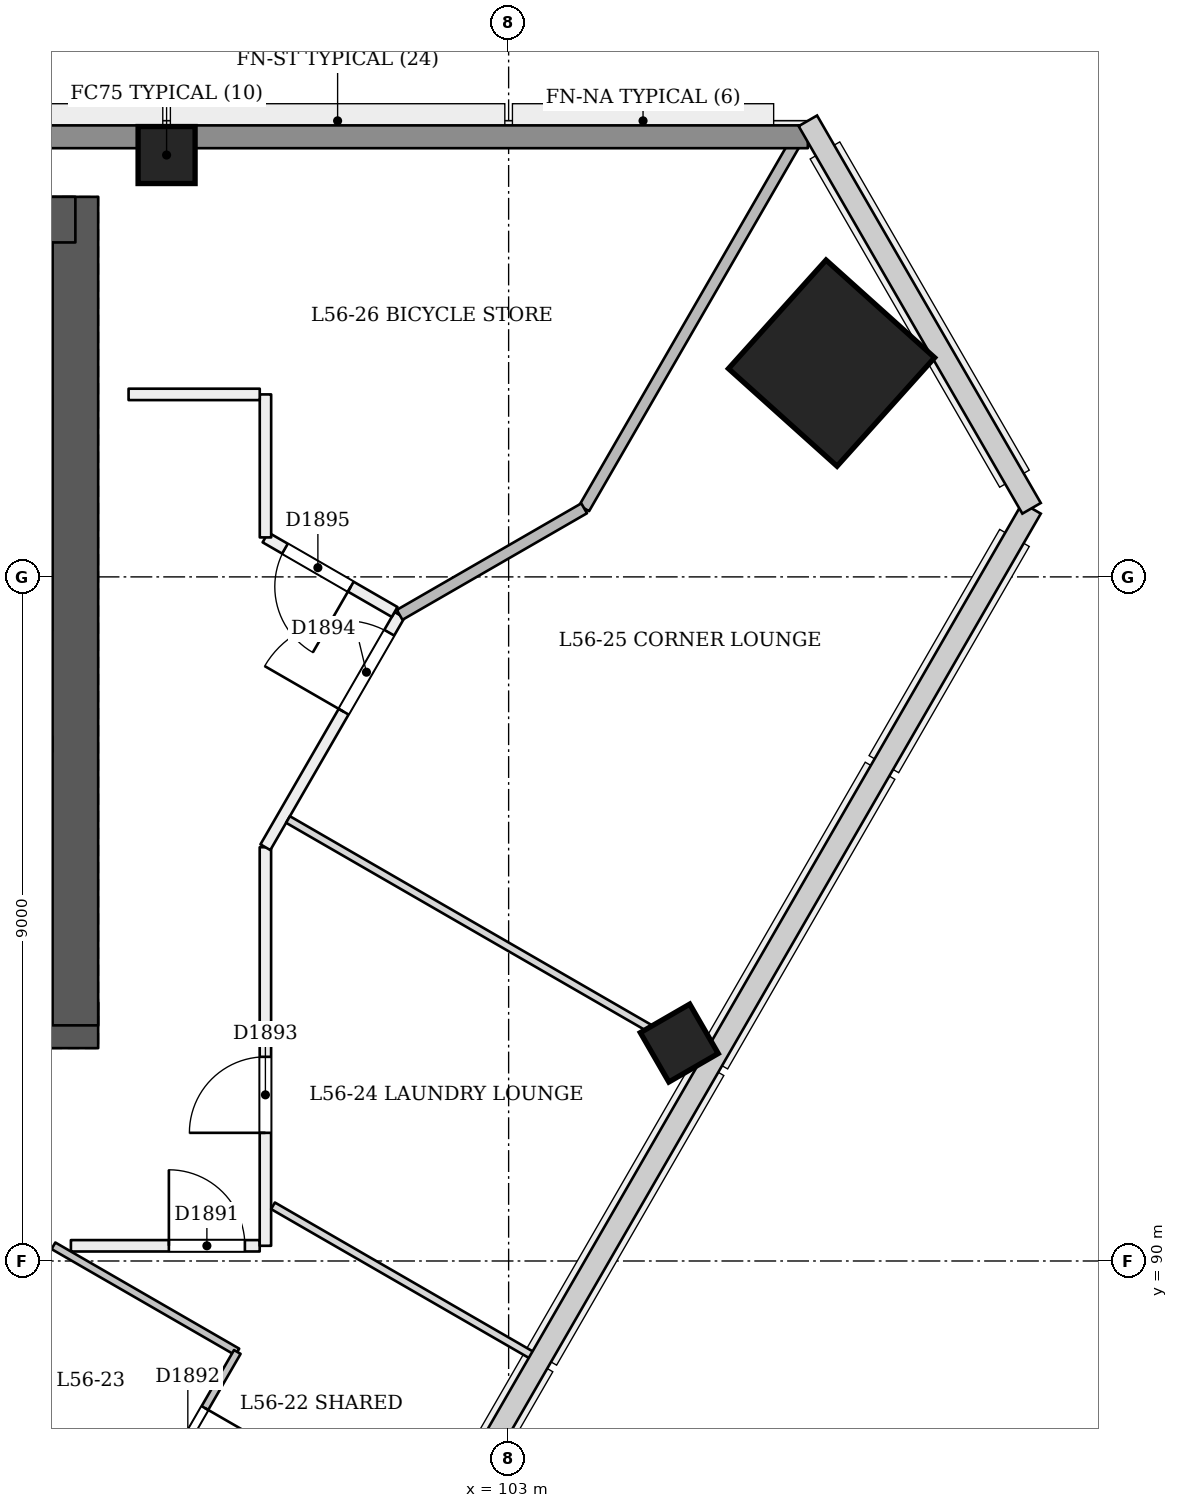
"""IFC4 building model, lengths in metres.
Left out: names, types, materials, properties, quantities, classifications, styles, units other than length and angle.
Written with IfcOpenShell. Run it as: python <this file> out.ifc"""

import sys

from ifc_helpers import new_model, si_unit, direction, frame, frame_2d, origin, origin_2d, place, context, subcontext, project, spatial, rectangle, extrude, element, fill, save


model = new_model("IFC4")
c1 = context("Model", 3, precision=1e-05, world=origin(), true_north=direction((0.0, 1.0)))
c2 = subcontext(c1, "Body", "Model", "MODEL_VIEW")
j1 = project(units=[si_unit("LENGTHUNIT", "METRE"), si_unit("PLANEANGLEUNIT", "RADIAN")], contexts=[c1])
p1 = place(None, origin())
s1 = spatial("IfcSite", under=j1, at=p1, CompositionType="ELEMENT")
p2 = place(p1, origin())
s2 = spatial("IfcBuilding", under=s1, at=p2, CompositionType="ELEMENT")
p3 = place(p2, frame((0.0, 0.0, 219.4)))
s3 = spatial("IfcBuildingStorey", under=s2, at=p3, CompositionType="ELEMENT", Elevation=219.4)
p4 = place(p3, frame((72.7, 93.1, 0.0), z_axis=(0.0, 0.0, 1.0), x_axis=(1.0, 0.0, 0.0)))
e1 = element("IfcWall", 1, at=p4, inside=s3, PredefinedType="SHEAR", context=c2, shape_type="SweptSolid", body=[
    extrude(rectangle(XDim=24.9, YDim=0.6, at=frame_2d((12.45, 0.0))), origin(), (0.0, 0.0, 1.0), 3.6),
])
p5 = place(p4, frame((1.1, 0.0, 0.0)))
e2 = element("IfcOpeningElement", 2, at=p5, cuts=e1, PredefinedType="OPENING", context=c2, shape_type="SweptSolid", body=[
    extrude(rectangle(XDim=1.2, YDim=2.1, at=frame_2d((0.6, 1.05))), frame((0.0, 0.311, 0.0), z_axis=(0.0, -1.0, 0.0), x_axis=(1.0, 0.0, 0.0)), (0.0, 0.0, 1.0), 0.621),
])
p6 = place(p4, frame((3.3, 0.0, 0.0)))
e3 = element("IfcOpeningElement", 3, at=p6, cuts=e1, PredefinedType="OPENING", context=c2, shape_type="SweptSolid", body=[
    extrude(rectangle(XDim=1.2, YDim=2.1, at=frame_2d((0.6, 1.05))), frame((0.0, 0.311, 0.0), z_axis=(0.0, -1.0, 0.0), x_axis=(1.0, 0.0, 0.0)), (0.0, 0.0, 1.0), 0.621),
])
p7 = place(p4, frame((13.3, 0.0, 0.0)))
e4 = element("IfcOpeningElement", 4, at=p7, cuts=e1, PredefinedType="OPENING", context=c2, shape_type="SweptSolid", body=[
    extrude(rectangle(XDim=1.2, YDim=2.1, at=frame_2d((0.6, 1.05))), frame((0.0, 0.311, 0.0), z_axis=(0.0, -1.0, 0.0), x_axis=(1.0, 0.0, 0.0)), (0.0, 0.0, 1.0), 0.621),
])
p8 = place(p4, frame((16.163, 0.0, 0.0)))
e5 = element("IfcOpeningElement", 5, at=p8, cuts=e1, PredefinedType="OPENING", context=c2, shape_type="SweptSolid", body=[
    extrude(rectangle(XDim=1.0, YDim=2.1, at=frame_2d((0.5, 1.05))), frame((0.0, 0.311, 0.0), z_axis=(0.0, -1.0, 0.0), x_axis=(1.0, 0.0, 0.0)), (0.0, 0.0, 1.0), 0.621),
])
p9 = place(p4, frame((19.6, 0.0, 0.0)))
e6 = element("IfcOpeningElement", 6, at=p9, cuts=e1, PredefinedType="OPENING", context=c2, shape_type="SweptSolid", body=[
    extrude(rectangle(XDim=1.0, YDim=2.1, at=frame_2d((0.5, 1.05))), frame((0.0, 0.311, 0.0), z_axis=(0.0, -1.0, 0.0), x_axis=(1.0, 0.0, 0.0)), (0.0, 0.0, 1.0), 0.621),
])
p10 = place(p4, frame((22.587, 0.0, 0.0)))
e7 = element("IfcOpeningElement", 7, at=p10, cuts=e1, PredefinedType="OPENING", context=c2, shape_type="SweptSolid", body=[
    extrude(rectangle(XDim=1.0, YDim=2.1, at=frame_2d((0.5, 1.05))), frame((0.0, 0.311, 0.0), z_axis=(0.0, -1.0, 0.0), x_axis=(1.0, 0.0, 0.0)), (0.0, 0.0, 1.0), 0.621),
])
p11 = place(p3, frame((97.3, 93.1, 0.0), z_axis=(0.0, 0.0, 1.0), x_axis=(0.0, 1.0, 0.0)))
e8 = element("IfcWall", 8, at=p11, inside=s3, PredefinedType="SHEAR", context=c2, shape_type="SweptSolid", body=[
    extrude(rectangle(XDim=10.9, YDim=0.6, at=frame_2d((5.45, 0.0))), origin(), (0.0, 0.0, 1.0), 3.6),
])
p12 = place(p3, frame((97.3, 103.7, 0.0), z_axis=(0.0, 0.0, 1.0), x_axis=(-1.0, 0.0, 0.0)))
e9 = element("IfcWall", 9, at=p12, inside=s3, PredefinedType="SHEAR", context=c2, shape_type="SweptSolid", body=[
    extrude(rectangle(XDim=24.9, YDim=0.6, at=frame_2d((12.45, 0.0))), origin(), (0.0, 0.0, 1.0), 3.6),
])
p13 = place(p3, frame((107.282, 101.801, 0.0), z_axis=(-0.028401796786, 0.009286506348, 0.999553449666), x_axis=(0.49888378352, -0.866383880746, 0.022224799739)))
e10 = element("IfcColumn", 10, at=p13, inside=s3, PredefinedType="COLUMN", context=c2, shape_type="SweptSolid", body=[
    extrude(rectangle(XDim=1.92, YDim=1.92, at=origin_2d()), origin(), (0.0, 0.0, 1.0), 3.602),
])
p14 = place(p3, frame((98.5, 104.55, 0.0), z_axis=(0.0, 0.0, 1.0), x_axis=(1.0, 0.0, 0.0)))
e11 = element("IfcColumn", 11, at=p14, inside=s3, PredefinedType="COLUMN", context=c2, shape_type="SweptSolid", body=[
    extrude(rectangle(XDim=0.75, YDim=0.75, at=origin_2d()), origin(), (0.0, 0.0, 1.0), 3.6),
])
p15 = place(p3, frame((105.272, 92.82, -0.024), z_axis=(-0.022212328788, 0.038465252292, 0.999013031354), x_axis=(-0.500169723916, -0.865642536618, 0.022209143937)))
e12 = element("IfcColumn", 12, at=p15, inside=s3, PredefinedType="COLUMN", context=c2, shape_type="SweptSolid", body=[
    extrude(rectangle(XDim=0.75, YDim=0.75, at=origin_2d()), origin(), (0.0, 0.0, 1.0), 3.605),
])
p16 = place(p3, frame((97.241, 90.2, 0.0), z_axis=(0.0, 0.0, 1.0), x_axis=(1.0, 0.0, 0.0)))
e13 = element("IfcWall", 13, at=p16, inside=s3, PredefinedType="PARTITIONING", context=c2, shape_type="SweptSolid", body=[
    extrude(rectangle(XDim=2.484, YDim=0.15, at=frame_2d((1.242, 0.0))), origin(), (0.0, 0.0, 1.0), 3.2),
])
p17 = place(p16, frame((1.289, 0.0, 0.0)))
e14 = element("IfcOpeningElement", 14, at=p17, cuts=e13, PredefinedType="OPENING", context=c2, shape_type="SweptSolid", body=[
    extrude(rectangle(XDim=1.0, YDim=2.1, at=frame_2d((0.5, 1.05))), frame((0.0, 0.085, 0.0), z_axis=(0.0, -1.0, 0.0), x_axis=(1.0, 0.0, 0.0)), (0.0, 0.0, 1.0), 0.171),
])
p18 = place(p3, frame((99.8, 90.2, 0.0), z_axis=(0.0, 0.0, 1.0), x_axis=(0.0, 1.0, 0.0)))
e15 = element("IfcWall", 15, at=p18, inside=s3, PredefinedType="PARTITIONING", context=c2, shape_type="SweptSolid", body=[
    extrude(rectangle(XDim=5.243, YDim=0.15, at=frame_2d((2.622, 0.0))), origin(), (0.0, 0.0, 1.0), 3.2),
])
p19 = place(p18, frame((1.486, 0.0, 0.0)))
e16 = element("IfcOpeningElement", 16, at=p19, cuts=e15, PredefinedType="OPENING", context=c2, shape_type="SweptSolid", body=[
    extrude(rectangle(XDim=1.0, YDim=2.1, at=frame_2d((0.5, 1.05))), frame((0.0, 0.085, 0.0), z_axis=(0.0, -1.0, 0.0), x_axis=(1.0, 0.0, 0.0)), (0.0, 0.0, 1.0), 0.171),
])
p20 = place(p3, frame((99.8, 95.443, 0.0), z_axis=(0.0, 0.0, 1.0), x_axis=(0.499977931934, 0.866038144413, 0.0)))
e17 = element("IfcWall", 17, at=p20, inside=s3, PredefinedType="PARTITIONING", context=c2, shape_type="SweptSolid", body=[
    extrude(rectangle(XDim=3.53, YDim=0.15, at=frame_2d((1.765, 0.0))), origin(), (0.0, 0.0, 1.0), 3.2),
])
p21 = place(p20, frame((2.059, 0.0, 0.0)))
e18 = element("IfcOpeningElement", 18, at=p21, cuts=e17, PredefinedType="OPENING", context=c2, shape_type="SweptSolid", body=[
    extrude(rectangle(XDim=1.2, YDim=2.1, at=frame_2d((0.6, 1.05))), frame((0.0, 0.085, 0.0), z_axis=(0.0, -1.0, 0.0), x_axis=(1.0, 0.0, 0.0)), (0.0, 0.0, 1.0), 0.171),
])
p22 = place(p3, frame((101.5, 98.538, 0.0), z_axis=(0.0, 0.0, 1.0), x_axis=(-0.865990805764, 0.500059920742, 0.0)))
e19 = element("IfcWall", 19, at=p22, inside=s3, PredefinedType="PARTITIONING", context=c2, shape_type="SweptSolid", body=[
    extrude(rectangle(XDim=1.962, YDim=0.15, at=frame_2d((0.981, 0.0))), origin(), (0.0, 0.0, 1.0), 3.2),
])
p23 = place(p22, frame((0.666, 0.0, 0.0)))
e20 = element("IfcOpeningElement", 20, at=p23, cuts=e19, PredefinedType="OPENING", context=c2, shape_type="SweptSolid", body=[
    extrude(rectangle(XDim=1.0, YDim=2.1, at=frame_2d((0.5, 1.05))), frame((0.0, 0.085, 0.0), z_axis=(0.0, -1.0, 0.0), x_axis=(1.0, 0.0, 0.0)), (0.0, 0.0, 1.0), 0.171),
])
p24 = place(p3, frame((99.801, 99.52, 0.0), z_axis=(0.0, 0.0, 1.0), x_axis=(-0.000259538014, 0.99999996632, 0.0)))
e21 = element("IfcWall", 21, at=p24, inside=s3, PredefinedType="PARTITIONING", context=c2, shape_type="SweptSolid", body=[
    extrude(rectangle(XDim=1.881, YDim=0.15, at=frame_2d((0.941, 0.0))), origin(), (0.0, 0.0, 1.0), 3.2),
])
p25 = place(p3, frame((99.726, 101.401, 0.0), z_axis=(0.0, 0.0, 1.0), x_axis=(-1.0, 0.0, 0.0)))
e22 = element("IfcWall", 22, at=p25, inside=s3, PredefinedType="PARTITIONING", context=c2, shape_type="SweptSolid", body=[
    extrude(rectangle(XDim=1.726, YDim=0.15, at=frame_2d((0.863, 0.0))), origin(), (0.0, 0.0, 1.0), 3.2),
])
p26 = place(p3, frame((98.061, 86.592, 0.0), z_axis=(0.0, 0.0, 1.0), x_axis=(-0.866011243319, 0.500024525844, 0.0)))
e23 = element("IfcWall", 23, at=p26, inside=s3, PredefinedType="PARTITIONING", context=c2, shape_type="SweptSolid", body=[
    extrude(rectangle(XDim=2.845, YDim=0.1, at=frame_2d((1.422, 0.0))), origin(), (0.0, 0.0, 1.0), 2.8),
])
p27 = place(p3, frame((97.011, 90.2, 0.0), z_axis=(0.0, 0.0, 1.0), x_axis=(0.866024034475, -0.500002371706, 0.0)))
e24 = element("IfcWall", 24, at=p27, inside=s3, PredefinedType="PARTITIONING", context=c2, shape_type="SweptSolid", body=[
    extrude(rectangle(XDim=2.793, YDim=0.1, at=frame_2d((1.397, 0.0))), origin(), (0.0, 0.0, 1.0), 3.2),
])
p28 = place(p3, frame((99.43, 88.803, 0.0), z_axis=(0.0, 0.0, 1.0), x_axis=(-0.499998129301, -0.86602648383, 0.0)))
e25 = element("IfcWall", 25, at=p28, inside=s3, PredefinedType="PARTITIONING", context=c2, shape_type="SweptSolid", body=[
    extrude(rectangle(XDim=2.3, YDim=0.1, at=frame_2d((1.15, 0.0))), origin(), (0.0, 0.0, 1.0), 3.2),
])
p29 = place(p28, frame((0.852, 0.0, 0.0)))
e26 = element("IfcOpeningElement", 26, at=p29, cuts=e25, PredefinedType="OPENING", context=c2, shape_type="SweptSolid", body=[
    extrude(rectangle(XDim=0.9, YDim=2.1, at=frame_2d((0.45, 1.05))), frame((0.0, 0.061, 0.0), z_axis=(0.0, -1.0, 0.0), x_axis=(1.0, 0.0, 0.0)), (0.0, 0.0, 1.0), 0.121),
])
p30 = place(p3, frame((103.343, 88.739, 0.0), z_axis=(0.0, 0.0, 1.0), x_axis=(-0.866031151917, 0.49999004381, 0.0)))
e27 = element("IfcWall", 27, at=p30, inside=s3, PredefinedType="PARTITIONING", context=c2, shape_type="SweptSolid", body=[
    extrude(rectangle(XDim=3.975, YDim=0.1, at=frame_2d((1.988, 0.0))), origin(), (0.0, 0.0, 1.0), 2.7),
])
p31 = place(p3, frame((105.575, 92.646, 0.0), z_axis=(0.0, 0.0, 1.0), x_axis=(-0.866015887322, 0.500016482634, 0.0)))
e28 = element("IfcWall", 28, at=p31, inside=s3, PredefinedType="PARTITIONING", context=c2, shape_type="SweptSolid", body=[
    extrude(rectangle(XDim=6.325, YDim=0.1, at=frame_2d((3.163, 0.0))), origin(), (0.0, 0.0, 1.0), 2.7),
])
p32 = place(p3, frame((106.879, 104.9, 0.0), z_axis=(0.0, 0.0, 1.0), x_axis=(-0.500020306647, -0.866013679419, 0.0)))
e29 = element("IfcWall", 29, at=p32, inside=s3, PredefinedType="PARTITIONING", context=c2, shape_type="SweptSolid", body=[
    extrude(rectangle(XDim=5.771, YDim=0.15, at=frame_2d((2.885, 0.0))), origin(), (0.0, 0.0, 1.0), 2.7),
])
p33 = place(p3, frame((103.993, 99.902, 0.0), z_axis=(0.0, 0.0, 1.0), x_axis=(-0.865994143547, -0.500054140411, 0.0)))
e30 = element("IfcWall", 30, at=p33, inside=s3, PredefinedType="PARTITIONING", context=c2, shape_type="SweptSolid", body=[
    extrude(rectangle(XDim=2.803, YDim=0.15, at=frame_2d((1.402, 0.0))), origin(), (0.0, 0.0, 1.0), 3.2),
])
p34 = place(p3, frame((63.063, 104.79, 0.0), z_axis=(0.0, 0.0, 1.0), x_axis=(1.0, 0.0, 0.0)))
e31 = element("IfcWall", 31, at=p34, inside=s3, PredefinedType="SOLIDWALL", context=c2, shape_type="SweptSolid", body=[
    extrude(rectangle(XDim=43.874, YDim=0.3, at=frame_2d((21.937, 0.0))), origin(), (0.0, 0.0, 1.0), 2.7),
])
p35 = place(p17, origin())
e32 = element("IfcDoor", 32, at=p35, inside=s3, OperationType="SINGLE_SWING_LEFT", PredefinedType="NOTDEFINED", context=c2, shape_type="SweptSolid", body=[
    extrude(rectangle(XDim=1.0, YDim=2.1, at=frame_2d((0.5, 1.05))), frame((0.0, 0.025, 0.0), z_axis=(0.0, -1.0, 0.0), x_axis=(1.0, 0.0, 0.0)), (0.0, 0.0, 1.0), 0.05),
])
fill(e14, e32)
p36 = place(p29, origin())
e33 = element("IfcDoor", 33, at=p36, inside=s3, OperationType="SINGLE_SWING_LEFT", PredefinedType="NOTDEFINED", context=c2, shape_type="SweptSolid", body=[
    extrude(rectangle(XDim=0.9, YDim=2.1, at=frame_2d((0.45, 1.05))), frame((0.0, 0.025, 0.0), z_axis=(0.0, -1.0, 0.0), x_axis=(1.0, 0.0, 0.0)), (0.0, 0.0, 1.0), 0.05),
])
fill(e26, e33)
p37 = place(p19, origin())
e34 = element("IfcDoor", 34, at=p37, inside=s3, OperationType="SINGLE_SWING_LEFT", PredefinedType="NOTDEFINED", context=c2, shape_type="SweptSolid", body=[
    extrude(rectangle(XDim=1.0, YDim=2.1, at=frame_2d((0.5, 1.05))), frame((0.0, 0.025, 0.0), z_axis=(0.0, -1.0, 0.0), x_axis=(1.0, 0.0, 0.0)), (0.0, 0.0, 1.0), 0.05),
])
fill(e16, e34)
p38 = place(p21, origin())
e35 = element("IfcDoor", 35, at=p38, inside=s3, OperationType="SINGLE_SWING_LEFT", PredefinedType="NOTDEFINED", context=c2, shape_type="SweptSolid", body=[
    extrude(rectangle(XDim=1.2, YDim=2.1, at=frame_2d((0.6, 1.05))), frame((0.0, 0.025, 0.0), z_axis=(0.0, -1.0, 0.0), x_axis=(1.0, 0.0, 0.0)), (0.0, 0.0, 1.0), 0.05),
])
fill(e18, e35)
p39 = place(p23, origin())
e36 = element("IfcDoor", 36, at=p39, inside=s3, OperationType="SINGLE_SWING_LEFT", PredefinedType="NOTDEFINED", context=c2, shape_type="SweptSolid", body=[
    extrude(rectangle(XDim=1.0, YDim=2.1, at=frame_2d((0.5, 1.05))), frame((0.0, 0.025, 0.0), z_axis=(0.0, -1.0, 0.0), x_axis=(1.0, 0.0, 0.0)), (0.0, 0.0, 1.0), 0.05),
])
fill(e20, e36)
save(model, sys.argv[1])
